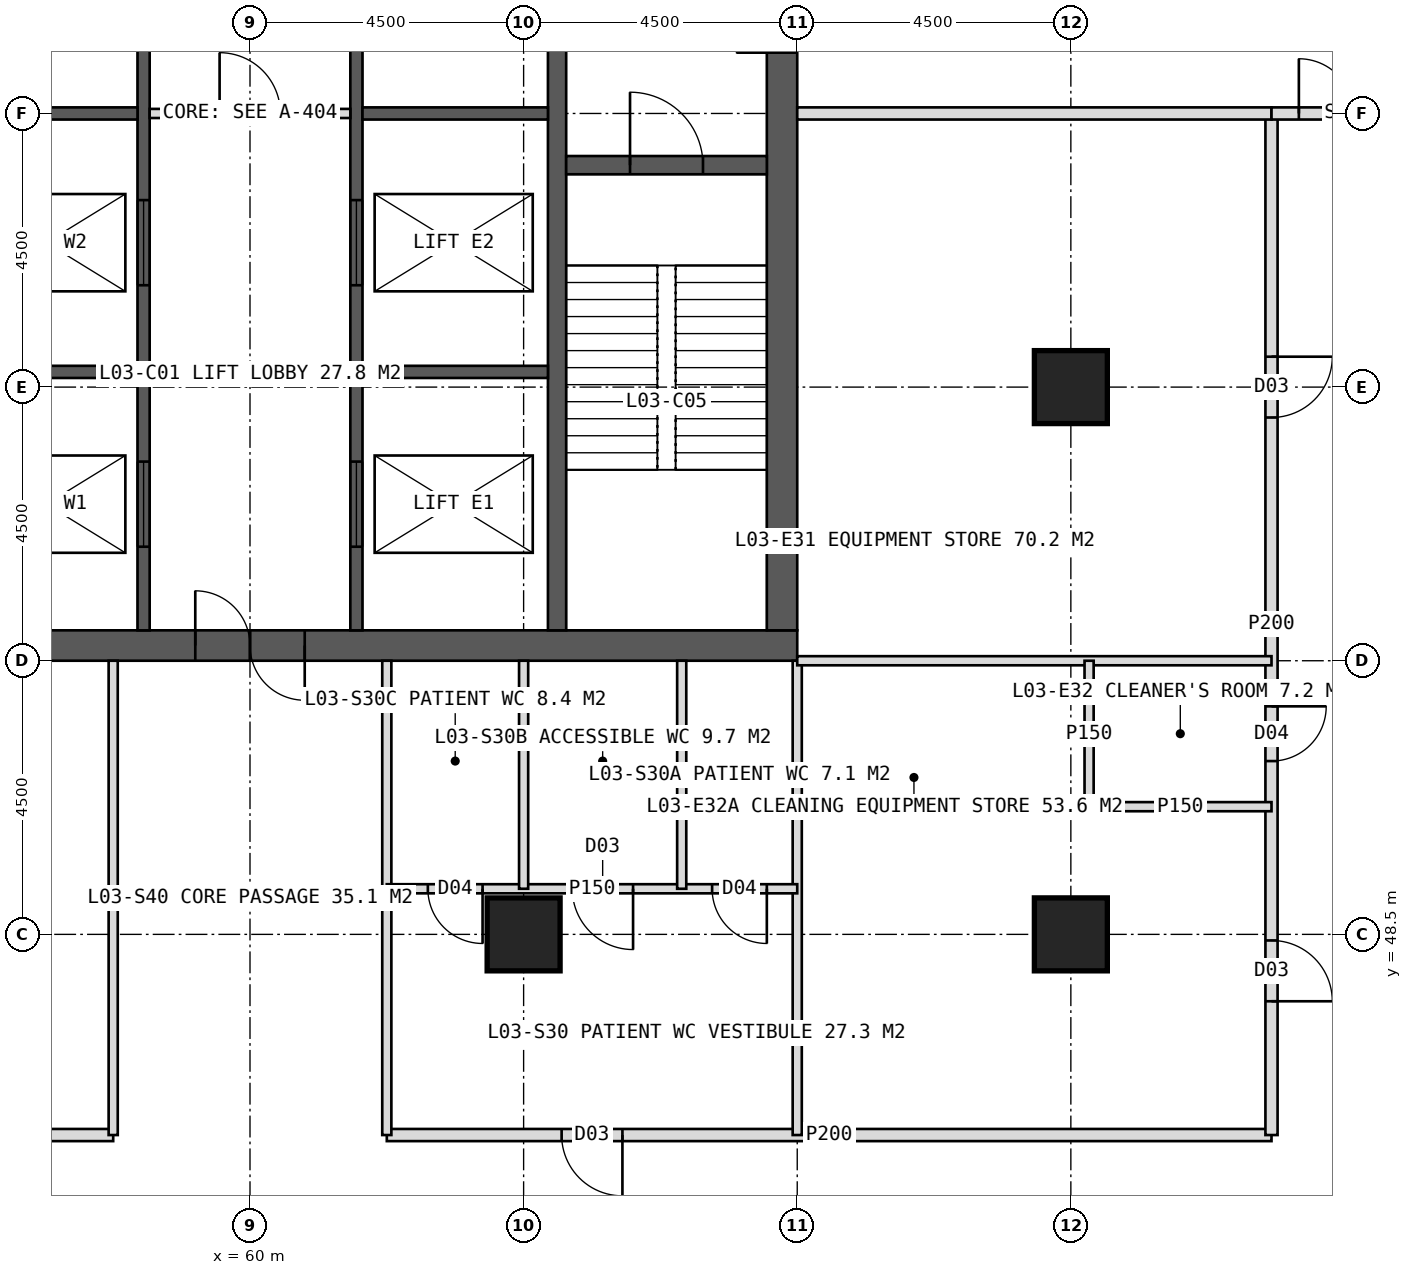
"""IFC4 building model, lengths in metres.
Left out: names, types, materials, properties, quantities, classifications, styles, units other than length and angle.
Written with IfcOpenShell. Run it as: python <this file> out.ifc"""

import sys

from ifc_helpers import new_model, si_unit, direction, frame, frame_2d, origin, origin_2d, place, context, subcontext, project, spatial, rectangle, hollow_rectangle, extrude, element, fill, save


model = new_model("IFC4")
c1 = context("Model", 3, precision=1e-05, world=origin(), true_north=direction((0.0, 1.0)))
c2 = subcontext(c1, "Body", "Model", "MODEL_VIEW")
j1 = project(units=[si_unit("LENGTHUNIT", "METRE"), si_unit("PLANEANGLEUNIT", "RADIAN")], contexts=[c1])
p1 = place(None, origin())
s1 = spatial("IfcSite", under=j1, at=p1, CompositionType="ELEMENT")
p2 = place(p1, origin())
s2 = spatial("IfcBuilding", under=s1, at=p2, CompositionType="ELEMENT")
p3 = place(p2, frame((0.0, 0.0, 16.5)))
s3 = spatial("IfcBuildingStorey", under=s2, at=p3, CompositionType="ELEMENT", Elevation=16.5)
p4 = place(p3, frame((51.0, 53.25, 0.0), z_axis=(0.0, 0.0, 1.0), x_axis=(1.0, 0.0, 0.0)))
e1 = element("IfcWall", 1, at=p4, inside=s3, PredefinedType="SHEAR", context=c2, shape_type="SweptSolid", body=[
    extrude(rectangle(XDim=18.0, YDim=0.5, at=frame_2d((9.0, 0.0))), origin(), (0.0, 0.0, 1.0), 4.5),
])
p5 = place(p4, frame((8.1, 0.0, 0.0)))
e2 = element("IfcOpeningElement", 2, at=p5, cuts=e1, PredefinedType="OPENING", context=c2, shape_type="SweptSolid", body=[
    extrude(rectangle(XDim=1.8, YDim=2.2, at=frame_2d((0.9, 1.1))), frame((0.0, 0.26, 0.0), z_axis=(0.0, -1.0, 0.0), x_axis=(1.0, 0.0, 0.0)), (0.0, 0.0, 1.0), 0.52),
])
p6 = place(p3, frame((68.75, 53.5, 0.0), z_axis=(0.0, 0.0, 1.0), x_axis=(0.0, 1.0, 0.0)))
e3 = element("IfcWall", 3, at=p6, inside=s3, PredefinedType="SHEAR", context=c2, shape_type="SweptSolid", body=[
    extrude(rectangle(XDim=17.0, YDim=0.5, at=frame_2d((8.5, 0.0))), origin(), (0.0, 0.0, 1.0), 4.5),
])
p7 = place(p6, frame((9.5, 0.0, 0.0)))
e4 = element("IfcOpeningElement", 4, at=p7, cuts=e3, PredefinedType="OPENING", context=c2, shape_type="SweptSolid", body=[
    extrude(rectangle(XDim=1.5, YDim=2.2, at=frame_2d((0.75, 1.1))), frame((0.0, 0.26, 0.0), z_axis=(0.0, -1.0, 0.0), x_axis=(1.0, 0.0, 0.0)), (0.0, 0.0, 1.0), 0.52),
])
p8 = place(p3, frame((65.05, 53.5, 0.0), z_axis=(0.0, 0.0, 1.0), x_axis=(0.0, 1.0, 0.0)))
e5 = element("IfcWall", 5, at=p8, inside=s3, PredefinedType="SHEAR", context=c2, shape_type="SweptSolid", body=[
    extrude(rectangle(XDim=17.0, YDim=0.3, at=frame_2d((8.5, 0.0))), origin(), (0.0, 0.0, 1.0), 4.5),
])
p9 = place(p3, frame((58.25, 53.5, 0.0), z_axis=(0.0, 0.0, 1.0), x_axis=(0.0, 1.0, 0.0)))
e6 = element("IfcWall", 6, at=p9, inside=s3, PredefinedType="SHEAR", context=c2, shape_type="SweptSolid", body=[
    extrude(rectangle(XDim=17.0, YDim=0.2, at=frame_2d((8.5, 0.0))), origin(), (0.0, 0.0, 1.0), 4.5),
])
p10 = place(p9, frame((1.375, 0.0, 0.0)))
e7 = element("IfcOpeningElement", 7, at=p10, cuts=e6, PredefinedType="OPENING", context=c2, shape_type="SweptSolid", body=[
    extrude(rectangle(XDim=1.4, YDim=2.2, at=frame_2d((0.7, 1.1))), frame((0.0, 0.11, 0.0), z_axis=(0.0, -1.0, 0.0), x_axis=(1.0, 0.0, 0.0)), (0.0, 0.0, 1.0), 0.22),
])
p11 = place(p9, frame((5.675, 0.0, 0.0)))
e8 = element("IfcOpeningElement", 8, at=p11, cuts=e6, PredefinedType="OPENING", context=c2, shape_type="SweptSolid", body=[
    extrude(rectangle(XDim=1.4, YDim=2.2, at=frame_2d((0.7, 1.1))), frame((0.0, 0.11, 0.0), z_axis=(0.0, -1.0, 0.0), x_axis=(1.0, 0.0, 0.0)), (0.0, 0.0, 1.0), 0.22),
])
p12 = place(p3, frame((61.75, 53.5, 0.0), z_axis=(0.0, 0.0, 1.0), x_axis=(0.0, 1.0, 0.0)))
e9 = element("IfcWall", 9, at=p12, inside=s3, PredefinedType="SHEAR", context=c2, shape_type="SweptSolid", body=[
    extrude(rectangle(XDim=17.0, YDim=0.2, at=frame_2d((8.5, 0.0))), origin(), (0.0, 0.0, 1.0), 4.5),
])
p13 = place(p12, frame((1.375, 0.0, 0.0)))
e10 = element("IfcOpeningElement", 10, at=p13, cuts=e9, PredefinedType="OPENING", context=c2, shape_type="SweptSolid", body=[
    extrude(rectangle(XDim=1.4, YDim=2.2, at=frame_2d((0.7, 1.1))), frame((0.0, 0.11, 0.0), z_axis=(0.0, -1.0, 0.0), x_axis=(1.0, 0.0, 0.0)), (0.0, 0.0, 1.0), 0.22),
])
p14 = place(p12, frame((5.675, 0.0, 0.0)))
e11 = element("IfcOpeningElement", 11, at=p14, cuts=e9, PredefinedType="OPENING", context=c2, shape_type="SweptSolid", body=[
    extrude(rectangle(XDim=1.4, YDim=2.2, at=frame_2d((0.7, 1.1))), frame((0.0, 0.11, 0.0), z_axis=(0.0, -1.0, 0.0), x_axis=(1.0, 0.0, 0.0)), (0.0, 0.0, 1.0), 0.22),
])
for number, where, z_axis, x_axis in (
    (12, (55.1, 57.75, 0.0), (0.0, 0.0, 1.0), (1.0, 0.0, 0.0)),
    (13, (61.85, 57.75, 0.0), (0.0, 0.0, 1.0), (1.0, 0.0, 0.0)),
    (14, (55.1, 62.0, 0.0), (0.0, 0.0, 1.0), (1.0, 0.0, 0.0)),
    (15, (61.85, 62.0, 0.0), (0.0, 0.0, 1.0), (1.0, 0.0, 0.0)),
):
    element("IfcWall", number, at=place(p3, frame(where, z_axis=z_axis, x_axis=x_axis)), inside=s3, PredefinedType="SHEAR", context=c2, shape_type="SweptSolid", body=[
        extrude(rectangle(XDim=3.05, YDim=0.2, at=frame_2d((1.525, 0.0))), origin(), (0.0, 0.0, 1.0), 4.5),
    ])
p15 = place(p3, frame((65.2, 61.15, 0.0), z_axis=(0.0, 0.0, 1.0), x_axis=(1.0, 0.0, 0.0)))
e16 = element("IfcWall", 16, at=p15, inside=s3, PredefinedType="SHEAR", context=c2, shape_type="SweptSolid", body=[
    extrude(rectangle(XDim=3.3, YDim=0.3, at=frame_2d((1.65, 0.0))), origin(), (0.0, 0.0, 1.0), 4.5),
])
p16 = place(p15, frame((1.05, 0.0, 0.0)))
e17 = element("IfcOpeningElement", 17, at=p16, cuts=e16, PredefinedType="OPENING", context=c2, shape_type="SweptSolid", body=[
    extrude(rectangle(XDim=1.2, YDim=2.1, at=frame_2d((0.6, 1.05))), frame((0.0, 0.16, 0.0), z_axis=(0.0, -1.0, 0.0), x_axis=(1.0, 0.0, 0.0)), (0.0, 0.0, 1.0), 0.32),
])
for number, where, z_axis, x_axis in (
    (18, (73.5, 48.5, 0.0), (0.0, 0.0, 1.0), (1.0, 0.0, 0.0)),
    (19, (64.5, 48.5, 0.0), (0.0, 0.0, 1.0), (1.0, 0.0, 0.0)),
    (20, (73.5, 57.5, 0.0), (0.0, 0.0, 1.0), (1.0, 0.0, 0.0)),
):
    element("IfcColumn", number, at=place(p3, frame(where, z_axis=z_axis, x_axis=x_axis)), inside=s3, PredefinedType="COLUMN", context=c2, shape_type="SweptSolid", body=[
        extrude(hollow_rectangle(XDim=1.2, YDim=1.2, WallThickness=0.1, at=origin_2d()), origin(), (0.0, 0.0, 1.0), 4.5),
    ])
p17 = place(p3, frame((76.8, 45.2, 0.0), z_axis=(0.0, 0.0, 1.0), x_axis=(-1.0, 0.0, 0.0)))
e21 = element("IfcWall", 21, at=p17, inside=s3, PredefinedType="PARTITIONING", context=c2, shape_type="SweptSolid", body=[
    extrude(rectangle(XDim=14.55, YDim=0.2, at=frame_2d((7.275, 0.0))), origin(), (0.0, 0.0, 1.0), 4.2),
])
p18 = place(p17, frame((10.675, 0.0, 0.0)))
e22 = element("IfcOpeningElement", 22, at=p18, cuts=e21, PredefinedType="OPENING", context=c2, shape_type="SweptSolid", body=[
    extrude(rectangle(XDim=1.0, YDim=2.1, at=frame_2d((0.5, 1.05))), frame((0.0, 0.11, 0.0), z_axis=(0.0, -1.0, 0.0), x_axis=(1.0, 0.0, 0.0)), (0.0, 0.0, 1.0), 0.22),
])
p19 = place(p3, frame((57.75, 45.2, 0.0), z_axis=(0.0, 0.0, 1.0), x_axis=(-1.0, 0.0, 0.0)))
e23 = element("IfcWall", 23, at=p19, inside=s3, PredefinedType="PARTITIONING", context=c2, shape_type="SweptSolid", body=[
    extrude(rectangle(XDim=14.55, YDim=0.2, at=frame_2d((7.275, 0.0))), origin(), (0.0, 0.0, 1.0), 4.2),
])
p20 = place(p19, frame((2.875, 0.0, 0.0)))
e24 = element("IfcOpeningElement", 24, at=p20, cuts=e23, PredefinedType="OPENING", context=c2, shape_type="SweptSolid", body=[
    extrude(rectangle(XDim=1.0, YDim=2.1, at=frame_2d((0.5, 1.05))), frame((0.0, 0.11, 0.0), z_axis=(0.0, -1.0, 0.0), x_axis=(1.0, 0.0, 0.0)), (0.0, 0.0, 1.0), 0.22),
])
p21 = place(p19, frame((10.15, 0.0, 0.0)))
e25 = element("IfcOpeningElement", 25, at=p21, cuts=e23, PredefinedType="OPENING", context=c2, shape_type="SweptSolid", body=[
    extrude(rectangle(XDim=1.0, YDim=2.1, at=frame_2d((0.5, 1.05))), frame((0.0, 0.11, 0.0), z_axis=(0.0, -1.0, 0.0), x_axis=(1.0, 0.0, 0.0)), (0.0, 0.0, 1.0), 0.22),
])
for number, where, z_axis, x_axis in (
    (26, (69.0, 53.0, 0.0), (0.0, 0.0, 1.0), (0.0, -1.0, 0.0)),
    (27, (62.25, 53.0, 0.0), (0.0, 0.0, 1.0), (0.0, -1.0, 0.0)),
    (28, (57.75, 53.0, 0.0), (0.0, 0.0, 1.0), (0.0, -1.0, 0.0)),
):
    element("IfcWall", number, at=place(p3, frame(where, z_axis=z_axis, x_axis=x_axis)), inside=s3, PredefinedType="PARTITIONING", context=c2, shape_type="SweptSolid", body=[
        extrude(rectangle(XDim=7.8, YDim=0.15, at=frame_2d((3.9, 0.0))), origin(), (0.0, 0.0, 1.0), 4.2),
    ])
p22 = place(p3, frame((69.0, 49.25, 0.0), z_axis=(0.0, 0.0, 1.0), x_axis=(-1.0, 0.0, 0.0)))
e29 = element("IfcWall", 29, at=p22, inside=s3, PredefinedType="PARTITIONING", context=c2, shape_type="SweptSolid", body=[
    extrude(rectangle(XDim=6.75, YDim=0.15, at=frame_2d((3.375, 0.0))), origin(), (0.0, 0.0, 1.0), 4.2),
])
p23 = place(p22, frame((0.5, 0.0, 0.0)))
e30 = element("IfcOpeningElement", 30, at=p23, cuts=e29, PredefinedType="OPENING", context=c2, shape_type="SweptSolid", body=[
    extrude(rectangle(XDim=0.9, YDim=2.1, at=frame_2d((0.45, 1.05))), frame((0.0, 0.085, 0.0), z_axis=(0.0, -1.0, 0.0), x_axis=(1.0, 0.0, 0.0)), (0.0, 0.0, 1.0), 0.17),
])
p24 = place(p22, frame((2.7, 0.0, 0.0)))
e31 = element("IfcOpeningElement", 31, at=p24, cuts=e29, PredefinedType="OPENING", context=c2, shape_type="SweptSolid", body=[
    extrude(rectangle(XDim=1.0, YDim=2.1, at=frame_2d((0.5, 1.05))), frame((0.0, 0.085, 0.0), z_axis=(0.0, -1.0, 0.0), x_axis=(1.0, 0.0, 0.0)), (0.0, 0.0, 1.0), 0.17),
])
p25 = place(p22, frame((5.175, 0.0, 0.0)))
e32 = element("IfcOpeningElement", 32, at=p25, cuts=e29, PredefinedType="OPENING", context=c2, shape_type="SweptSolid", body=[
    extrude(rectangle(XDim=0.9, YDim=2.1, at=frame_2d((0.45, 1.05))), frame((0.0, 0.085, 0.0), z_axis=(0.0, -1.0, 0.0), x_axis=(1.0, 0.0, 0.0)), (0.0, 0.0, 1.0), 0.17),
])
p26 = place(p3, frame((67.1, 53.0, 0.0), z_axis=(0.0, 0.0, 1.0), x_axis=(0.0, -1.0, 0.0)))
e33 = element("IfcWall", 33, at=p26, inside=s3, PredefinedType="PARTITIONING", context=c2, shape_type="SweptSolid", body=[
    extrude(rectangle(XDim=3.75, YDim=0.15, at=frame_2d((1.875, 0.0))), origin(), (0.0, 0.0, 1.0), 4.2),
])
p27 = place(p3, frame((64.5, 53.0, 0.0), z_axis=(0.0, 0.0, 1.0), x_axis=(0.0, -1.0, 0.0)))
e34 = element("IfcWall", 34, at=p27, inside=s3, PredefinedType="PARTITIONING", context=c2, shape_type="SweptSolid", body=[
    extrude(rectangle(XDim=3.75, YDim=0.15, at=frame_2d((1.875, 0.0))), origin(), (0.0, 0.0, 1.0), 3.3),
])
p28 = place(p3, frame((76.8, 62.0, 0.0), z_axis=(0.0, 0.0, 1.0), x_axis=(0.0, -1.0, 0.0)))
e35 = element("IfcWall", 35, at=p28, inside=s3, PredefinedType="PARTITIONING", context=c2, shape_type="SweptSolid", body=[
    extrude(rectangle(XDim=16.8, YDim=0.2, at=frame_2d((8.4, 0.0))), origin(), (0.0, 0.0, 1.0), 4.2),
])
p29 = place(p28, frame((4.0, 0.0, 0.0)))
e36 = element("IfcOpeningElement", 36, at=p29, cuts=e35, PredefinedType="OPENING", context=c2, shape_type="SweptSolid", body=[
    extrude(rectangle(XDim=1.0, YDim=2.1, at=frame_2d((0.5, 1.05))), frame((0.0, 0.11, 0.0), z_axis=(0.0, -1.0, 0.0), x_axis=(1.0, 0.0, 0.0)), (0.0, 0.0, 1.0), 0.22),
])
p30 = place(p28, frame((9.75, 0.0, 0.0)))
e37 = element("IfcOpeningElement", 37, at=p30, cuts=e35, PredefinedType="OPENING", context=c2, shape_type="SweptSolid", body=[
    extrude(rectangle(XDim=0.9, YDim=2.1, at=frame_2d((0.45, 1.05))), frame((0.0, 0.11, 0.0), z_axis=(0.0, -1.0, 0.0), x_axis=(1.0, 0.0, 0.0)), (0.0, 0.0, 1.0), 0.22),
])
p31 = place(p28, frame((13.6, 0.0, 0.0)))
e38 = element("IfcOpeningElement", 38, at=p31, cuts=e35, PredefinedType="OPENING", context=c2, shape_type="SweptSolid", body=[
    extrude(rectangle(XDim=1.0, YDim=2.1, at=frame_2d((0.5, 1.05))), frame((0.0, 0.11, 0.0), z_axis=(0.0, -1.0, 0.0), x_axis=(1.0, 0.0, 0.0)), (0.0, 0.0, 1.0), 0.22),
])
p32 = place(p3, frame((69.0, 62.0, 0.0), z_axis=(0.0, 0.0, 1.0), x_axis=(1.0, 0.0, 0.0)))
e39 = element("IfcWall", 39, at=p32, inside=s3, PredefinedType="SOLIDWALL", context=c2, shape_type="SweptSolid", body=[
    extrude(rectangle(XDim=7.8, YDim=0.2, at=frame_2d((3.9, 0.0))), origin(), (0.0, 0.0, 1.0), 3.4),
])
p33 = place(p3, frame((69.0, 53.0, 0.0), z_axis=(0.0, 0.0, 1.0), x_axis=(1.0, 0.0, 0.0)))
e40 = element("IfcWall", 40, at=p33, inside=s3, PredefinedType="PARTITIONING", context=c2, shape_type="SweptSolid", body=[
    extrude(rectangle(XDim=7.8, YDim=0.15, at=frame_2d((3.9, 0.0))), origin(), (0.0, 0.0, 1.0), 4.2),
])
p34 = place(p3, frame((73.8, 50.6, 0.0), z_axis=(0.0, 0.0, 1.0), x_axis=(1.0, 0.0, 0.0)))
e41 = element("IfcWall", 41, at=p34, inside=s3, PredefinedType="PARTITIONING", context=c2, shape_type="SweptSolid", body=[
    extrude(rectangle(XDim=3.0, YDim=0.15, at=frame_2d((1.5, 0.0))), origin(), (0.0, 0.0, 1.0), 4.2),
])
p35 = place(p3, frame((73.8, 53.0, 0.0), z_axis=(0.0, 0.0, 1.0), x_axis=(0.0, -1.0, 0.0)))
e42 = element("IfcWall", 42, at=p35, inside=s3, PredefinedType="PARTITIONING", context=c2, shape_type="SweptSolid", body=[
    extrude(rectangle(XDim=2.4, YDim=0.15, at=frame_2d((1.2, 0.0))), origin(), (0.0, 0.0, 1.0), 4.2),
])
p36 = place(p3, frame((76.8, 62.0, 0.0), z_axis=(0.0, 0.0, 1.0), x_axis=(1.0, 0.0, 0.0)))
e43 = element("IfcWall", 43, at=p36, inside=s3, PredefinedType="SOLIDWALL", context=c2, shape_type="SweptSolid", body=[
    extrude(rectangle(XDim=2.7, YDim=0.2, at=frame_2d((1.35, 0.0))), origin(), (0.0, 0.0, 1.0), 3.4),
])
p37 = place(p36, frame((0.45, 0.0, 0.0)))
e44 = element("IfcOpeningElement", 44, at=p37, cuts=e43, PredefinedType="OPENING", context=c2, shape_type="SweptSolid", body=[
    extrude(rectangle(XDim=1.8, YDim=2.2, at=frame_2d((0.9, 1.1))), frame((0.0, 0.11, 0.0), z_axis=(0.0, -1.0, 0.0), x_axis=(1.0, 0.0, 0.0)), (0.0, 0.0, 1.0), 0.22),
])
p38 = place(p3, frame((58.35, 62.0, 0.0), z_axis=(0.0, 0.0, 1.0), x_axis=(1.0, 0.0, 0.0)))
e45 = element("IfcWall", 45, at=p38, inside=s3, PredefinedType="PARTITIONING", context=c2, shape_type="SweptSolid", body=[
    extrude(rectangle(XDim=3.3, YDim=0.15, at=frame_2d((1.65, 0.0))), origin(), (0.0, 0.0, 1.0), 4.2),
])
p39 = place(p38, frame((1.15, 0.0, 0.0)))
e46 = element("IfcOpeningElement", 46, at=p39, cuts=e45, PredefinedType="OPENING", context=c2, shape_type="SweptSolid", body=[
    extrude(rectangle(XDim=1.0, YDim=2.1, at=frame_2d((0.5, 1.05))), frame((0.0, 0.085, 0.0), z_axis=(0.0, -1.0, 0.0), x_axis=(1.0, 0.0, 0.0)), (0.0, 0.0, 1.0), 0.17),
])
p40 = place(p18, origin())
e47 = element("IfcDoor", 47, at=p40, inside=s3, OperationType="SINGLE_SWING_LEFT", PredefinedType="DOOR", context=c2, shape_type="SweptSolid", body=[
    extrude(rectangle(XDim=1.0, YDim=2.1, at=frame_2d((0.5, 1.05))), frame((0.0, 0.025, 0.0), z_axis=(0.0, -1.0, 0.0), x_axis=(1.0, 0.0, 0.0)), (0.0, 0.0, 1.0), 0.05),
])
fill(e22, e47)
p41 = place(p29, origin())
e48 = element("IfcDoor", 48, at=p41, inside=s3, OperationType="SINGLE_SWING_LEFT", PredefinedType="DOOR", context=c2, shape_type="SweptSolid", body=[
    extrude(rectangle(XDim=1.0, YDim=2.1, at=frame_2d((0.5, 1.05))), frame((0.0, 0.025, 0.0), z_axis=(0.0, -1.0, 0.0), x_axis=(1.0, 0.0, 0.0)), (0.0, 0.0, 1.0), 0.05),
])
fill(e36, e48)
p42 = place(p37, origin())
e49 = element("IfcDoor", 49, at=p42, inside=s3, OperationType="DOUBLE_DOOR_DOUBLE_SWING", PredefinedType="DOOR", context=c2, shape_type="SweptSolid", body=[
    extrude(rectangle(XDim=1.8, YDim=2.2, at=frame_2d((0.9, 1.1))), frame((0.0, 0.025, 0.0), z_axis=(0.0, -1.0, 0.0), x_axis=(1.0, 0.0, 0.0)), (0.0, 0.0, 1.0), 0.05),
])
fill(e44, e49)
p43 = place(p5, origin())
e50 = element("IfcDoor", 50, at=p43, inside=s3, OperationType="DOUBLE_DOOR_SINGLE_SWING", PredefinedType="DOOR", context=c2, shape_type="SweptSolid", body=[
    extrude(rectangle(XDim=1.8, YDim=2.2, at=frame_2d((0.9, 1.1))), frame((0.0, 0.025, 0.0), z_axis=(0.0, -1.0, 0.0), x_axis=(1.0, 0.0, 0.0)), (0.0, 0.0, 1.0), 0.05),
])
fill(e2, e50)
p44 = place(p16, origin())
e51 = element("IfcDoor", 51, at=p44, inside=s3, OperationType="SINGLE_SWING_LEFT", PredefinedType="DOOR", context=c2, shape_type="SweptSolid", body=[
    extrude(rectangle(XDim=1.2, YDim=2.1, at=frame_2d((0.6, 1.05))), frame((0.0, 0.025, 0.0), z_axis=(0.0, -1.0, 0.0), x_axis=(1.0, 0.0, 0.0)), (0.0, 0.0, 1.0), 0.05),
])
fill(e17, e51)
p45 = place(p10, origin())
e52 = element("IfcDoor", 52, at=p45, inside=s3, OperationType="SLIDING_TO_LEFT", PredefinedType="DOOR", context=c2, shape_type="SweptSolid", body=[
    extrude(rectangle(XDim=1.4, YDim=2.2, at=frame_2d((0.7, 1.1))), frame((0.0, 0.025, 0.0), z_axis=(0.0, -1.0, 0.0), x_axis=(1.0, 0.0, 0.0)), (0.0, 0.0, 1.0), 0.05),
])
fill(e7, e52)
p46 = place(p13, origin())
e53 = element("IfcDoor", 53, at=p46, inside=s3, OperationType="SLIDING_TO_LEFT", PredefinedType="DOOR", context=c2, shape_type="SweptSolid", body=[
    extrude(rectangle(XDim=1.4, YDim=2.2, at=frame_2d((0.7, 1.1))), frame((0.0, 0.025, 0.0), z_axis=(0.0, -1.0, 0.0), x_axis=(1.0, 0.0, 0.0)), (0.0, 0.0, 1.0), 0.05),
])
fill(e10, e53)
p47 = place(p11, origin())
e54 = element("IfcDoor", 54, at=p47, inside=s3, OperationType="SLIDING_TO_LEFT", PredefinedType="DOOR", context=c2, shape_type="SweptSolid", body=[
    extrude(rectangle(XDim=1.4, YDim=2.2, at=frame_2d((0.7, 1.1))), frame((0.0, 0.025, 0.0), z_axis=(0.0, -1.0, 0.0), x_axis=(1.0, 0.0, 0.0)), (0.0, 0.0, 1.0), 0.05),
])
fill(e8, e54)
p48 = place(p14, origin())
e55 = element("IfcDoor", 55, at=p48, inside=s3, OperationType="SLIDING_TO_LEFT", PredefinedType="DOOR", context=c2, shape_type="SweptSolid", body=[
    extrude(rectangle(XDim=1.4, YDim=2.2, at=frame_2d((0.7, 1.1))), frame((0.0, 0.025, 0.0), z_axis=(0.0, -1.0, 0.0), x_axis=(1.0, 0.0, 0.0)), (0.0, 0.0, 1.0), 0.05),
])
fill(e11, e55)
p49 = place(p39, origin())
e56 = element("IfcDoor", 56, at=p49, inside=s3, OperationType="SINGLE_SWING_LEFT", PredefinedType="DOOR", context=c2, shape_type="SweptSolid", body=[
    extrude(rectangle(XDim=1.0, YDim=2.1, at=frame_2d((0.5, 1.05))), frame((0.0, 0.025, 0.0), z_axis=(0.0, -1.0, 0.0), x_axis=(1.0, 0.0, 0.0)), (0.0, 0.0, 1.0), 0.05),
])
fill(e46, e56)
p50 = place(p23, origin())
e57 = element("IfcDoor", 57, at=p50, inside=s3, OperationType="SINGLE_SWING_LEFT", PredefinedType="DOOR", context=c2, shape_type="SweptSolid", body=[
    extrude(rectangle(XDim=0.9, YDim=2.1, at=frame_2d((0.45, 1.05))), frame((0.0, 0.025, 0.0), z_axis=(0.0, -1.0, 0.0), x_axis=(1.0, 0.0, 0.0)), (0.0, 0.0, 1.0), 0.05),
])
fill(e30, e57)
p51 = place(p24, origin())
e58 = element("IfcDoor", 58, at=p51, inside=s3, OperationType="SINGLE_SWING_LEFT", PredefinedType="DOOR", context=c2, shape_type="SweptSolid", body=[
    extrude(rectangle(XDim=1.0, YDim=2.1, at=frame_2d((0.5, 1.05))), frame((0.0, 0.025, 0.0), z_axis=(0.0, -1.0, 0.0), x_axis=(1.0, 0.0, 0.0)), (0.0, 0.0, 1.0), 0.05),
])
fill(e31, e58)
p52 = place(p25, origin())
e59 = element("IfcDoor", 59, at=p52, inside=s3, OperationType="SINGLE_SWING_LEFT", PredefinedType="DOOR", context=c2, shape_type="SweptSolid", body=[
    extrude(rectangle(XDim=0.9, YDim=2.1, at=frame_2d((0.45, 1.05))), frame((0.0, 0.025, 0.0), z_axis=(0.0, -1.0, 0.0), x_axis=(1.0, 0.0, 0.0)), (0.0, 0.0, 1.0), 0.05),
])
fill(e32, e59)
p53 = place(p30, origin())
e60 = element("IfcDoor", 60, at=p53, inside=s3, OperationType="SINGLE_SWING_LEFT", PredefinedType="DOOR", context=c2, shape_type="SweptSolid", body=[
    extrude(rectangle(XDim=0.9, YDim=2.1, at=frame_2d((0.45, 1.05))), frame((0.0, 0.025, 0.0), z_axis=(0.0, -1.0, 0.0), x_axis=(1.0, 0.0, 0.0)), (0.0, 0.0, 1.0), 0.05),
])
fill(e37, e60)
p54 = place(p31, origin())
e61 = element("IfcDoor", 61, at=p54, inside=s3, OperationType="SINGLE_SWING_RIGHT", PredefinedType="DOOR", context=c2, shape_type="SweptSolid", body=[
    extrude(rectangle(XDim=1.0, YDim=2.1, at=frame_2d((0.5, 1.05))), frame((0.0, 0.025, 0.0), z_axis=(0.0, -1.0, 0.0), x_axis=(1.0, 0.0, 0.0)), (0.0, 0.0, 1.0), 0.05),
])
fill(e38, e61)
save(model, sys.argv[1])
